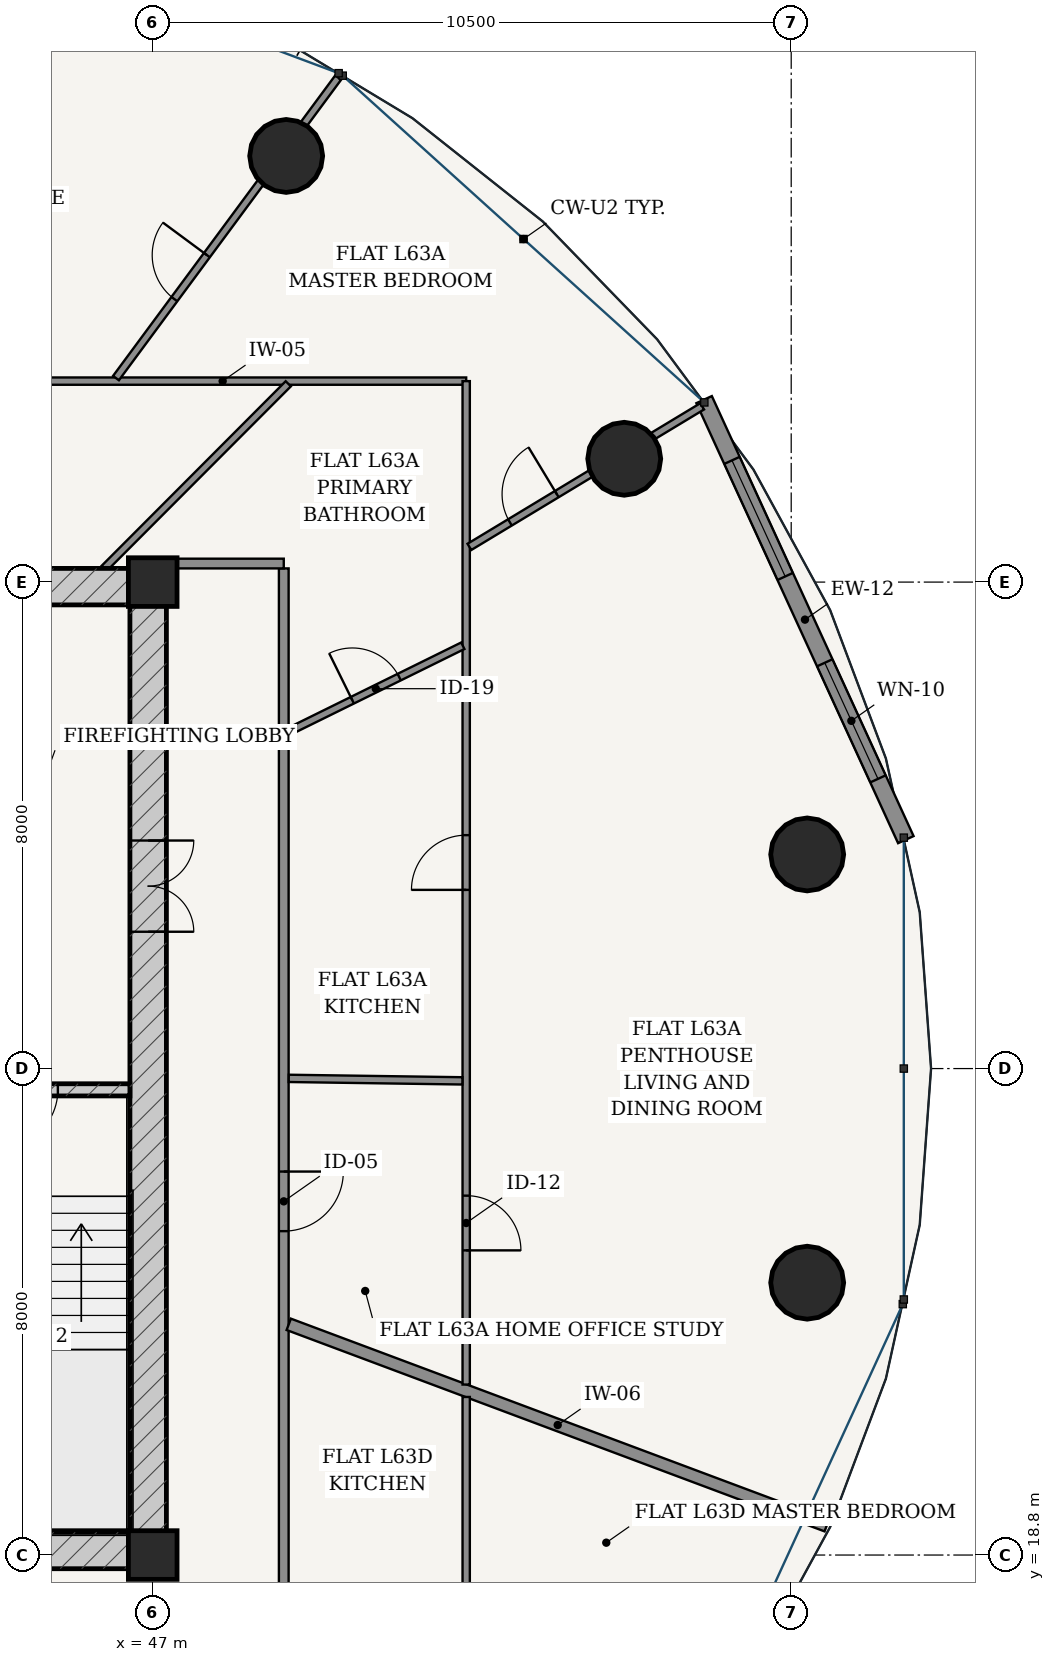
"""IFC4 building model, lengths in metres.
Left out: names, types, materials, properties, quantities, classifications, styles, units other than length and angle.
Written with IfcOpenShell. Run it as: python <this file> out.ifc"""

import sys

from ifc_helpers import new_model, si_unit, direction, frame, frame_2d, origin, origin_2d, place, context, subcontext, project, spatial, rectangle, hollow_circle, extrude, source, transform, mapped, element, fill, save


model = new_model("IFC4")
c1 = context("Model", 3, precision=1e-05, world=origin(), true_north=direction((-0.2419218956, 0.970295726276)))
c2 = subcontext(c1, "Body", "Model", "MODEL_VIEW")
j1 = project(units=[si_unit("LENGTHUNIT", "METRE"), si_unit("PLANEANGLEUNIT", "RADIAN")], contexts=[c1])
p1 = place(None, origin())
s1 = spatial("IfcSite", under=j1, at=p1, CompositionType="ELEMENT")
p2 = place(p1, origin())
s2 = spatial("IfcBuilding", under=s1, at=p2, CompositionType="ELEMENT")
p3 = place(p2, frame((0.0, 0.0, 239.3)))
s3 = spatial("IfcBuildingStorey", under=s2, at=p3, CompositionType="ELEMENT", Elevation=239.3)
for number, where, z_axis, x_axis in (
    (1, (47.0, 18.8, 0.0), (0.0, 0.0, 1.0), (1.0, 0.0, 0.0)),
    (2, (47.0, 34.8, 0.0), (0.0, 0.0, 1.0), (1.0, 0.0, 0.0)),
):
    element("IfcColumn", number, at=place(p3, frame(where, z_axis=z_axis, x_axis=x_axis)), inside=s3, PredefinedType="COLUMN", context=c2, shape_type="SweptSolid", body=[
        extrude(rectangle(XDim=0.8, YDim=0.8, at=origin_2d()), origin(), (0.0, 0.0, 1.0), 3.7),
    ])
p4 = place(p3, frame((28.775, 18.875, 0.0), z_axis=(0.0, 0.0, 1.0), x_axis=(1.0, 0.0, 0.0)))
e3 = element("IfcWall", 3, at=p4, inside=s3, PredefinedType="SHEAR", context=c2, shape_type="SweptSolid", body=[
    extrude(rectangle(XDim=18.45, YDim=0.6, at=frame_2d((9.225, 0.0))), origin(), (0.0, 0.0, 1.0), 3.25),
])
p5 = place(p4, frame((6.76, 0.0, 0.0)))
e4 = element("IfcOpeningElement", 4, at=p5, cuts=e3, PredefinedType="OPENING", context=c2, shape_type="SweptSolid", body=[
    extrude(rectangle(XDim=0.85, YDim=2.1, at=frame_2d((0.425, 1.05))), frame((0.0, 0.31, 0.0), z_axis=(0.0, -1.0, 0.0), x_axis=(1.0, 0.0, 0.0)), (0.0, 0.0, 1.0), 0.62),
])
p6 = place(p4, frame((8.8, 0.0, 0.0)))
e5 = element("IfcOpeningElement", 5, at=p6, cuts=e3, PredefinedType="OPENING", context=c2, shape_type="SweptSolid", body=[
    extrude(rectangle(XDim=0.85, YDim=2.1, at=frame_2d((0.425, 1.05))), frame((0.0, 0.31, 0.0), z_axis=(0.0, -1.0, 0.0), x_axis=(1.0, 0.0, 0.0)), (0.0, 0.0, 1.0), 0.62),
])
p7 = place(p4, frame((10.84, 0.0, 0.0)))
e6 = element("IfcOpeningElement", 6, at=p7, cuts=e3, PredefinedType="OPENING", context=c2, shape_type="SweptSolid", body=[
    extrude(rectangle(XDim=0.85, YDim=2.1, at=frame_2d((0.425, 1.05))), frame((0.0, 0.31, 0.0), z_axis=(0.0, -1.0, 0.0), x_axis=(1.0, 0.0, 0.0)), (0.0, 0.0, 1.0), 0.62),
])
p8 = place(p3, frame((28.775, 34.725, 0.0), z_axis=(0.0, 0.0, 1.0), x_axis=(1.0, 0.0, 0.0)))
e7 = element("IfcWall", 7, at=p8, inside=s3, PredefinedType="SHEAR", context=c2, shape_type="SweptSolid", body=[
    extrude(rectangle(XDim=18.45, YDim=0.6, at=frame_2d((9.225, 0.0))), origin(), (0.0, 0.0, 1.0), 3.25),
])
p9 = place(p3, frame((46.925, 19.175, 0.0), z_axis=(0.0, 0.0, 1.0), x_axis=(0.0, 1.0, 0.0)))
e8 = element("IfcWall", 8, at=p9, inside=s3, PredefinedType="SHEAR", context=c2, shape_type="SweptSolid", body=[
    extrude(rectangle(XDim=15.25, YDim=0.6, at=frame_2d((7.625, 0.0))), origin(), (0.0, 0.0, 1.0), 3.25),
])
p10 = place(p9, frame((9.875, 0.0, 0.0)))
e9 = element("IfcOpeningElement", 9, at=p10, cuts=e8, PredefinedType="OPENING", context=c2, shape_type="SweptSolid", body=[
    extrude(rectangle(XDim=1.5, YDim=2.2, at=frame_2d((0.75, 1.1))), frame((0.0, 0.31, 0.0), z_axis=(0.0, -1.0, 0.0), x_axis=(1.0, 0.0, 0.0)), (0.0, 0.0, 1.0), 0.62),
])
p11 = place(p3, frame((43.305, 26.45, 0.0), z_axis=(0.0, 0.0, 1.0), x_axis=(1.0, 0.0, 0.0)))
e10 = element("IfcWall", 10, at=p11, inside=s3, PredefinedType="SOLIDWALL", context=c2, shape_type="SweptSolid", body=[
    extrude(rectangle(XDim=3.32, YDim=0.2, at=frame_2d((1.66, 0.0))), origin(), (0.0, 0.0, 1.0), 3.25),
])
p12 = place(p11, frame((1.185, 0.0, 0.0)))
e11 = element("IfcOpeningElement", 11, at=p12, cuts=e10, PredefinedType="OPENING", context=c2, shape_type="SweptSolid", body=[
    extrude(rectangle(XDim=0.95, YDim=2.15, at=frame_2d((0.475, 1.075))), frame((0.0, 0.11, 0.0), z_axis=(0.0, -1.0, 0.0), x_axis=(1.0, 0.0, 0.0)), (0.0, 0.0, 1.0), 0.22),
])
for number, where, z_axis, x_axis in (
    (12, (57.763, 30.321, 0.0), (0.0, 0.0, 1.0), (1.0, 0.0, 0.0)),
    (13, (54.754, 36.828, 0.0), (0.0, 0.0, 1.0), (1.0, 0.0, 0.0)),
    (14, (49.195, 41.808, 0.0), (0.0, 0.0, 1.0), (1.0, 0.0, 0.0)),
    (15, (57.763, 23.279, 0.0), (0.0, 0.0, 1.0), (1.0, 0.0, 0.0)),
):
    element("IfcColumn", number, at=place(p3, frame(where, z_axis=z_axis, x_axis=x_axis)), inside=s3, PredefinedType="COLUMN", context=c2, shape_type="SweptSolid", body=[
        extrude(hollow_circle(Radius=0.6, WallThickness=0.038, at=origin_2d()), origin(), (0.0, 0.0, 1.0), 3.7),
    ])
p13 = place(p3, frame((59.385, 30.565, 0.0), z_axis=(0.0, 0.0, 1.0), x_axis=(-0.416717018135, 0.909036262641, 0.0)))
e16 = element("IfcWall", 16, at=p13, inside=s3, PredefinedType="SOLIDWALL", context=c2, shape_type="SweptSolid", body=[
    extrude(rectangle(XDim=7.96, YDim=0.28, at=frame_2d((3.98, 0.0))), origin(), (0.0, 0.0, 1.0), 3.25),
])
p14 = place(p13, frame((1.099, 0.0, 0.85)))
e17 = element("IfcOpeningElement", 17, at=p14, cuts=e16, PredefinedType="OPENING", context=c2, shape_type="SweptSolid", body=[
    extrude(rectangle(XDim=2.1, YDim=1.95, at=frame_2d((1.05, 0.975))), frame((0.0, 0.15, 0.0), z_axis=(0.0, -1.0, 0.0), x_axis=(1.0, 0.0, 0.0)), (0.0, 0.0, 1.0), 0.3),
])
p15 = place(p13, frame((4.761, 0.0, 0.85)))
e18 = element("IfcOpeningElement", 18, at=p15, cuts=e16, PredefinedType="OPENING", context=c2, shape_type="SweptSolid", body=[
    extrude(rectangle(XDim=2.1, YDim=1.95, at=frame_2d((1.05, 0.975))), frame((0.0, 0.15, 0.0), z_axis=(0.0, -1.0, 0.0), x_axis=(1.0, 0.0, 0.0)), (0.0, 0.0, 1.0), 0.3),
])
p16 = place(p3, frame((49.155, 16.725, 0.0), z_axis=(0.0, 0.0, 1.0), x_axis=(0.0, 1.0, 0.0)))
e19 = element("IfcWall", 19, at=p16, inside=s3, PredefinedType="PARTITIONING", context=c2, shape_type="SweptSolid", body=[
    extrude(rectangle(XDim=18.3, YDim=0.16, at=frame_2d((9.15, 0.0))), origin(), (0.0, 0.0, 1.0), 2.775),
])
p17 = place(p16, frame((7.401, 0.0, 0.0)))
e20 = element("IfcOpeningElement", 20, at=p17, cuts=e19, PredefinedType="OPENING", context=c2, shape_type="SweptSolid", body=[
    extrude(rectangle(XDim=0.98, YDim=2.2, at=frame_2d((0.49, 1.1))), frame((0.0, 0.09, 0.0), z_axis=(0.0, -1.0, 0.0), x_axis=(1.0, 0.0, 0.0)), (0.0, 0.0, 1.0), 0.18),
])
p18 = place(p3, frame((47.225, 35.105, 0.0), z_axis=(0.0, 0.0, 1.0), x_axis=(1.0, 0.0, 0.0)))
e21 = element("IfcWall", 21, at=p18, inside=s3, PredefinedType="PARTITIONING", context=c2, shape_type="SweptSolid", body=[
    extrude(rectangle(XDim=1.93, YDim=0.16, at=frame_2d((0.965, 0.0))), origin(), (0.0, 0.0, 1.0), 3.25),
])
p19 = place(p3, frame((49.237, 22.594, 0.0), z_axis=(0.0, 0.0, 1.0), x_axis=(0.936534016635, -0.350576718687, 0.0)))
e22 = element("IfcWall", 22, at=p19, inside=s3, PredefinedType="PARTITIONING", context=c2, shape_type="SweptSolid", body=[
    extrude(rectangle(XDim=9.446, YDim=0.2, at=frame_2d((4.723, 0.0))), origin(), (0.0, 0.0, 1.0), 2.881),
])
p20 = place(p3, frame((44.145, 38.105, 0.0), z_axis=(0.0, 0.0, 1.0), x_axis=(1.0, 0.0, 0.0)))
e23 = element("IfcWall", 23, at=p20, inside=s3, PredefinedType="PARTITIONING", context=c2, shape_type="SweptSolid", body=[
    extrude(rectangle(XDim=8.01, YDim=0.12, at=frame_2d((4.005, 0.0))), origin(), (0.0, 0.0, 1.0), 2.775),
])
p21 = place(p3, frame((52.155, 38.105, 0.0), z_axis=(0.0, 0.0, 1.0), x_axis=(0.0, -1.0, 0.0)))
e24 = element("IfcWall", 24, at=p21, inside=s3, PredefinedType="PARTITIONING", context=c2, shape_type="SweptSolid", body=[
    extrude(rectangle(XDim=16.501, YDim=0.12, at=frame_2d((8.251, 0.0))), origin(), (0.0, 0.0, 1.0), 2.775),
])
p22 = place(p21, frame((13.395, 0.0, 0.0)))
e25 = element("IfcOpeningElement", 25, at=p22, cuts=e24, PredefinedType="OPENING", context=c2, shape_type="SweptSolid", body=[
    extrude(rectangle(XDim=0.9, YDim=2.15, at=frame_2d((0.45, 1.075))), frame((0.0, 0.07, 0.0), z_axis=(0.0, -1.0, 0.0), x_axis=(1.0, 0.0, 0.0)), (0.0, 0.0, 1.0), 0.14),
])
p23 = place(p21, frame((7.467, 0.0, 0.0)))
e26 = element("IfcOpeningElement", 26, at=p23, cuts=e24, PredefinedType="OPENING", context=c2, shape_type="SweptSolid", body=[
    extrude(rectangle(XDim=0.9, YDim=2.15, at=frame_2d((0.45, 1.075))), frame((0.0, 0.07, 0.0), z_axis=(0.0, -1.0, 0.0), x_axis=(1.0, 0.0, 0.0)), (0.0, 0.0, 1.0), 0.14),
])
p24 = place(p3, frame((52.208, 35.379, 0.0), z_axis=(0.0, 0.0, 1.0), x_axis=(0.856039372964, 0.516910622774, 0.0)))
e27 = element("IfcWall", 27, at=p24, inside=s3, PredefinedType="PARTITIONING", context=c2, shape_type="SweptSolid", body=[
    extrude(rectangle(XDim=4.471, YDim=0.12, at=frame_2d((2.236, 0.0))), origin(), (0.0, 0.0, 1.0), 2.6),
])
p25 = place(p24, frame((0.779, 0.0, 0.0)))
e28 = element("IfcOpeningElement", 28, at=p25, cuts=e27, PredefinedType="OPENING", context=c2, shape_type="SweptSolid", body=[
    extrude(rectangle(XDim=0.9, YDim=2.15, at=frame_2d((0.45, 1.075))), frame((0.0, 0.07, 0.0), z_axis=(0.0, -1.0, 0.0), x_axis=(1.0, 0.0, 0.0)), (0.0, 0.0, 1.0), 0.14),
])
p26 = place(p3, frame((46.396, 38.155, 0.0), z_axis=(0.0, 0.0, 1.0), x_axis=(0.594526205526, 0.804076234535, 0.0)))
e29 = element("IfcWall", 29, at=p26, inside=s3, PredefinedType="PARTITIONING", context=c2, shape_type="SweptSolid", body=[
    extrude(rectangle(XDim=6.146, YDim=0.12, at=frame_2d((3.073, 0.0))), origin(), (0.0, 0.0, 1.0), 2.6),
])
p27 = place(p26, frame((1.615, 0.0, 0.0)))
e30 = element("IfcOpeningElement", 30, at=p27, cuts=e29, PredefinedType="OPENING", context=c2, shape_type="SweptSolid", body=[
    extrude(rectangle(XDim=0.9, YDim=2.15, at=frame_2d((0.45, 1.075))), frame((0.0, 0.07, 0.0), z_axis=(0.0, -1.0, 0.0), x_axis=(1.0, 0.0, 0.0)), (0.0, 0.0, 1.0), 0.14),
])
p28 = place(p3, frame((49.237, 26.639, 0.0), z_axis=(0.0, 0.0, 1.0), x_axis=(0.999896890624, -0.014359948506, 0.0)))
e31 = element("IfcWall", 31, at=p28, inside=s3, PredefinedType="PARTITIONING", context=c2, shape_type="SweptSolid", body=[
    extrude(rectangle(XDim=2.856, YDim=0.12, at=frame_2d((1.428, 0.0))), origin(), (0.0, 0.0, 1.0), 2.969),
])
p29 = place(p3, frame((49.237, 32.341, 0.0), z_axis=(0.0, 0.0, 1.0), x_axis=(0.896876689717, 0.442280684004, 0.0)))
e32 = element("IfcWall", 32, at=p29, inside=s3, PredefinedType="PARTITIONING", context=c2, shape_type="SweptSolid", body=[
    extrude(rectangle(XDim=3.192, YDim=0.12, at=frame_2d((1.596, 0.0))), origin(), (0.0, 0.0, 1.0), 2.969),
])
p30 = place(p29, frame((1.166, 0.0, 0.0)))
e33 = element("IfcOpeningElement", 33, at=p30, cuts=e32, PredefinedType="OPENING", context=c2, shape_type="SweptSolid", body=[
    extrude(rectangle(XDim=0.86, YDim=2.15, at=frame_2d((0.43, 1.075))), frame((0.0, 0.07, 0.0), z_axis=(0.0, -1.0, 0.0), x_axis=(1.0, 0.0, 0.0)), (0.0, 0.0, 1.0), 0.14),
])
p31 = place(p3, frame((46.203, 35.026, 0.0), z_axis=(0.0, 0.0, 1.0), x_axis=(0.706080585752, 0.708131489502, 0.0)))
e34 = element("IfcWall", 34, at=p31, inside=s3, PredefinedType="PARTITIONING", context=c2, shape_type="SweptSolid", body=[
    extrude(rectangle(XDim=4.285, YDim=0.12, at=frame_2d((2.143, 0.0))), origin(), (0.0, 0.0, 1.0), 2.775),
])
p32 = place(p3, frame((52.155, 21.4, 0.0), z_axis=(0.0, 0.0, 1.0), x_axis=(0.0, -1.0, 0.0)))
e35 = element("IfcWall", 35, at=p32, inside=s3, PredefinedType="PARTITIONING", context=c2, shape_type="SweptSolid", body=[
    extrude(rectangle(XDim=7.755, YDim=0.12, at=frame_2d((3.877, 0.0))), origin(), (0.0, 0.0, 1.0), 2.775),
])
p33 = place(p32, frame((3.214, 0.0, 0.0)))
e36 = element("IfcOpeningElement", 36, at=p33, cuts=e35, PredefinedType="OPENING", context=c2, shape_type="SweptSolid", body=[
    extrude(rectangle(XDim=0.9, YDim=2.15, at=frame_2d((0.45, 1.075))), frame((0.0, 0.07, 0.0), z_axis=(0.0, -1.0, 0.0), x_axis=(1.0, 0.0, 0.0)), (0.0, 0.0, 1.0), 0.14),
])
m1 = source(origin(), c2, "Body", "SweptSolid", [
    extrude(rectangle(XDim=2.1, YDim=1.95, at=frame_2d((1.05, 0.975))), frame((0.0, 0.03, 0.0), z_axis=(0.0, -1.0, 0.0), x_axis=(1.0, 0.0, 0.0)), (0.0, 0.0, 1.0), 0.06),
])
p34 = place(p14, origin())
e37 = element("IfcWindow", 37, at=p34, inside=s3, PartitioningType="SINGLE_PANEL", PredefinedType="WINDOW", context=c2, shape_type="MappedRepresentation", body=[
    mapped(m1, transform((0.0, 0.0, 0.0), scale=1.0)),
])
fill(e17, e37)
p35 = place(p15, origin())
e38 = element("IfcWindow", 38, at=p35, inside=s3, PartitioningType="SINGLE_PANEL", PredefinedType="WINDOW", context=c2, shape_type="MappedRepresentation", body=[
    mapped(m1, transform((0.0, 0.0, 0.0), scale=1.0)),
])
fill(e18, e38)
m2 = source(origin(), c2, "Body", "SweptSolid", [
    extrude(rectangle(XDim=1.5, YDim=2.2, at=frame_2d((0.75, 1.1))), frame((0.0, 0.025, 0.0), z_axis=(0.0, -1.0, 0.0), x_axis=(1.0, 0.0, 0.0)), (0.0, 0.0, 1.0), 0.05),
])
p36 = place(p10, frame((1.5, 0.0, 0.0), z_axis=(0.0, 0.0, 1.0), x_axis=(-1.0, 0.0, 0.0)))
e39 = element("IfcDoor", 39, at=p36, inside=s3, OperationType="DOUBLE_DOOR_SINGLE_SWING", PredefinedType="DOOR", context=c2, shape_type="MappedRepresentation", body=[
    mapped(m2, transform((0.0, 0.0, 0.0), scale=1.0)),
])
fill(e9, e39)
m3 = source(origin(), c2, "Body", "SweptSolid", [
    extrude(rectangle(XDim=0.95, YDim=2.15, at=frame_2d((0.475, 1.075))), frame((0.0, 0.025, 0.0), z_axis=(0.0, -1.0, 0.0), x_axis=(1.0, 0.0, 0.0)), (0.0, 0.0, 1.0), 0.05),
])
p37 = place(p12, frame((0.95, 0.0, 0.0), z_axis=(0.0, 0.0, 1.0), x_axis=(-1.0, 0.0, 0.0)))
e40 = element("IfcDoor", 40, at=p37, inside=s3, OperationType="SINGLE_SWING_RIGHT", PredefinedType="DOOR", context=c2, shape_type="MappedRepresentation", body=[
    mapped(m3, transform((0.0, 0.0, 0.0), scale=1.0)),
])
fill(e11, e40)
m4 = source(origin(), c2, "Body", "SweptSolid", [
    extrude(rectangle(XDim=0.98, YDim=2.2, at=frame_2d((0.49, 1.1))), frame((0.0, 0.025, 0.0), z_axis=(0.0, -1.0, 0.0), x_axis=(1.0, 0.0, 0.0)), (0.0, 0.0, 1.0), 0.05),
])
p38 = place(p17, frame((0.98, 0.0, 0.0), z_axis=(0.0, 0.0, 1.0), x_axis=(-1.0, 0.0, 0.0)))
e41 = element("IfcDoor", 41, at=p38, inside=s3, OperationType="SINGLE_SWING_LEFT", PredefinedType="DOOR", context=c2, shape_type="MappedRepresentation", body=[
    mapped(m4, transform((0.0, 0.0, 0.0), scale=1.0)),
])
fill(e20, e41)
m5 = source(origin(), c2, "Body", "SweptSolid", [
    extrude(rectangle(XDim=0.9, YDim=2.15, at=frame_2d((0.45, 1.075))), frame((0.0, 0.025, 0.0), z_axis=(0.0, -1.0, 0.0), x_axis=(1.0, 0.0, 0.0)), (0.0, 0.0, 1.0), 0.05),
])
p39 = place(p22, origin())
e42 = element("IfcDoor", 42, at=p39, inside=s3, OperationType="SINGLE_SWING_RIGHT", PredefinedType="DOOR", context=c2, shape_type="MappedRepresentation", body=[
    mapped(m5, transform((0.0, 0.0, 0.0), scale=1.0)),
])
fill(e25, e42)
p40 = place(p23, frame((0.9, 0.0, 0.0), z_axis=(0.0, 0.0, 1.0), x_axis=(-1.0, 0.0, 0.0)))
e43 = element("IfcDoor", 43, at=p40, inside=s3, OperationType="SINGLE_SWING_LEFT", PredefinedType="DOOR", context=c2, shape_type="MappedRepresentation", body=[
    mapped(m5, transform((0.0, 0.0, 0.0), scale=1.0)),
])
fill(e26, e43)
p41 = place(p25, origin())
e44 = element("IfcDoor", 44, at=p41, inside=s3, OperationType="SINGLE_SWING_RIGHT", PredefinedType="DOOR", context=c2, shape_type="MappedRepresentation", body=[
    mapped(m5, transform((0.0, 0.0, 0.0), scale=1.0)),
])
fill(e28, e44)
m6 = source(origin(), c2, "Body", "SweptSolid", [
    extrude(rectangle(XDim=0.86, YDim=2.15, at=frame_2d((0.43, 1.075))), frame((0.0, 0.025, 0.0), z_axis=(0.0, -1.0, 0.0), x_axis=(1.0, 0.0, 0.0)), (0.0, 0.0, 1.0), 0.05),
])
p42 = place(p30, origin())
e45 = element("IfcDoor", 45, at=p42, inside=s3, OperationType="SINGLE_SWING_LEFT", PredefinedType="DOOR", context=c2, shape_type="MappedRepresentation", body=[
    mapped(m6, transform((0.0, 0.0, 0.0), scale=1.0)),
])
fill(e33, e45)
p43 = place(p27, origin())
e46 = element("IfcDoor", 46, at=p43, inside=s3, OperationType="SINGLE_SWING_RIGHT", PredefinedType="DOOR", context=c2, shape_type="MappedRepresentation", body=[
    mapped(m5, transform((0.0, 0.0, 0.0), scale=1.0)),
])
fill(e30, e46)
save(model, sys.argv[1])
